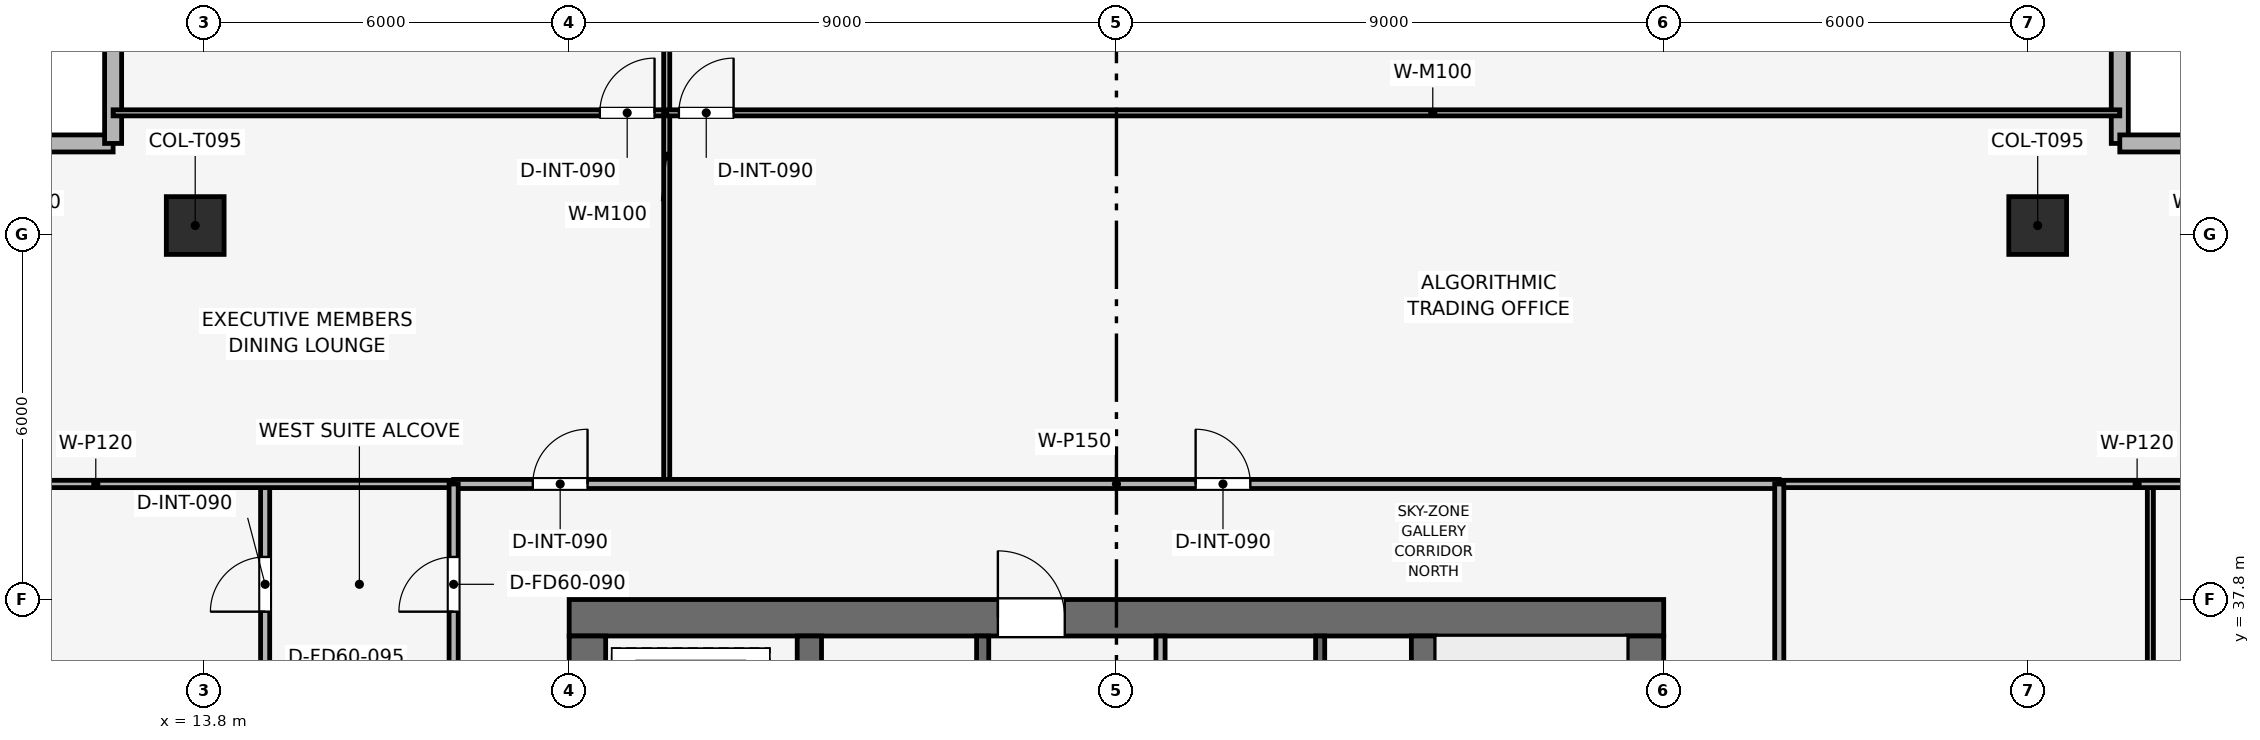
"""IFC4 building model, lengths in metres.
Left out: names, types, materials, properties, quantities, classifications, styles, units other than length and angle.
Written with IfcOpenShell. Run it as: python <this file> out.ifc"""

import sys

from ifc_helpers import new_model, si_unit, direction, frame, frame_2d, origin, origin_2d, place, context, subcontext, project, spatial, rectangle, extrude, element, fill, save


model = new_model("IFC4")
c1 = context("Model", 3, precision=1e-05, world=origin(), true_north=direction((0.0, 1.0)))
c2 = subcontext(c1, "Body", "Model", "MODEL_VIEW")
j1 = project(units=[si_unit("LENGTHUNIT", "METRE"), si_unit("PLANEANGLEUNIT", "RADIAN")], contexts=[c1])
p1 = place(None, origin())
s1 = spatial("IfcSite", under=j1, at=p1, CompositionType="ELEMENT")
p2 = place(p1, origin())
s2 = spatial("IfcBuilding", under=s1, at=p2, CompositionType="ELEMENT")
p3 = place(p2, frame((0.0, 0.0, 321.75)))
s3 = spatial("IfcBuildingStorey", under=s2, at=p3, CompositionType="ELEMENT", Elevation=321.75)
p4 = place(p3, frame((19.8, 37.5, 0.0), z_axis=(0.0, 0.0, 1.0), x_axis=(1.0, 0.0, 0.0)))
e1 = element("IfcWall", 1, at=p4, inside=s3, PredefinedType="SHEAR", context=c2, shape_type="SweptSolid", body=[
    extrude(rectangle(XDim=18.0, YDim=0.6, at=frame_2d((9.0, 0.0))), origin(), (0.0, 0.0, 1.0), 3.75),
])
p5 = place(p4, frame((7.05, 0.0, 0.0)))
e2 = element("IfcOpeningElement", 2, at=p5, cuts=e1, PredefinedType="OPENING", context=c2, shape_type="SweptSolid", body=[
    extrude(rectangle(XDim=1.1, YDim=2.15, at=frame_2d((0.55, 1.075))), frame((0.0, 0.31, 0.0), z_axis=(0.0, -1.0, 0.0), x_axis=(1.0, 0.0, 0.0)), (0.0, 0.0, 1.0), 0.62),
])
p6 = place(p3, frame((20.1, 20.4, 0.0), z_axis=(0.0, 0.0, 1.0), x_axis=(0.0, 1.0, 0.0)))
e3 = element("IfcWall", 3, at=p6, inside=s3, PredefinedType="SHEAR", context=c2, shape_type="SweptSolid", body=[
    extrude(rectangle(XDim=16.8, YDim=0.6, at=frame_2d((8.4, 0.0))), origin(), (0.0, 0.0, 1.0), 3.75),
])
p7 = place(p6, frame((10.4, 0.0, 0.0)))
e4 = element("IfcOpeningElement", 4, at=p7, cuts=e3, PredefinedType="OPENING", context=c2, shape_type="SweptSolid", body=[
    extrude(rectangle(XDim=1.1, YDim=2.15, at=frame_2d((0.55, 1.075))), frame((0.0, 0.31, 0.0), z_axis=(0.0, -1.0, 0.0), x_axis=(1.0, 0.0, 0.0)), (0.0, 0.0, 1.0), 0.62),
])
p8 = place(p3, frame((37.5, 20.4, 0.0), z_axis=(0.0, 0.0, 1.0), x_axis=(0.0, 1.0, 0.0)))
e5 = element("IfcWall", 5, at=p8, inside=s3, PredefinedType="SHEAR", context=c2, shape_type="SweptSolid", body=[
    extrude(rectangle(XDim=16.8, YDim=0.6, at=frame_2d((8.4, 0.0))), origin(), (0.0, 0.0, 1.0), 3.75),
])
p9 = place(p8, frame((4.9, 0.0, 0.0)))
e6 = element("IfcOpeningElement", 6, at=p9, cuts=e5, PredefinedType="OPENING", context=c2, shape_type="SweptSolid", body=[
    extrude(rectangle(XDim=1.1, YDim=2.15, at=frame_2d((0.55, 1.075))), frame((0.0, 0.31, 0.0), z_axis=(0.0, -1.0, 0.0), x_axis=(1.0, 0.0, 0.0)), (0.0, 0.0, 1.0), 0.62),
])
for number, where, z_axis, x_axis in (
    (7, (23.75, 20.4, 0.0), (0.0, 0.0, 1.0), (0.0, 1.0, 0.0)),
    (8, (33.85, 20.4, 0.0), (0.0, 0.0, 1.0), (0.0, 1.0, 0.0)),
):
    element("IfcWall", number, at=place(p3, frame(where, z_axis=z_axis, x_axis=x_axis)), inside=s3, PredefinedType="SHEAR", context=c2, shape_type="SweptSolid", body=[
        extrude(rectangle(XDim=16.8, YDim=0.4, at=frame_2d((8.4, 0.0))), origin(), (0.0, 0.0, 1.0), 3.75),
    ])
for number, where, z_axis, x_axis in (
    (9, (43.95, 43.95, 0.003), (0.0, 0.0, 1.0), (1.0, 0.0, 0.0)),
    (10, (13.65, 43.95, 0.003), (0.0, 0.0, 1.0), (1.0, 0.0, 0.0)),
):
    element("IfcColumn", number, at=place(p3, frame(where, z_axis=z_axis, x_axis=x_axis)), inside=s3, PredefinedType="COLUMN", context=c2, shape_type="SweptSolid", body=[
        extrude(rectangle(XDim=0.95, YDim=0.95, at=origin_2d()), origin(), (0.0, 0.0, 1.0), 3.504),
    ])
p10 = place(p3, frame((6.13, 45.3, 0.0), z_axis=(0.0, 0.0, 1.0), x_axis=(1.0, 0.0, 0.0)))
e11 = element("IfcWall", 11, at=p10, inside=s3, PredefinedType="SOLIDWALL", context=c2, shape_type="SweptSolid", body=[
    extrude(rectangle(XDim=6.17, YDim=0.28, at=frame_2d((3.085, 0.0))), origin(), (0.0, 0.0, 1.0), 3.51),
])
p11 = place(p10, frame((1.835, 0.0, 0.9)))
e12 = element("IfcOpeningElement", 12, at=p11, cuts=e11, PredefinedType="OPENING", context=c2, shape_type="SweptSolid", body=[
    extrude(rectangle(XDim=2.5, YDim=1.9, at=frame_2d((1.25, 0.95))), frame((0.0, 0.15, 0.0), z_axis=(0.0, -1.0, 0.0), x_axis=(1.0, 0.0, 0.0)), (0.0, 0.0, 1.0), 0.3),
])
p12 = place(p3, frame((12.3, 45.3, 0.0), z_axis=(0.0, 0.0, 1.0), x_axis=(0.0, 1.0, 0.0)))
e13 = element("IfcWall", 13, at=p12, inside=s3, PredefinedType="SOLIDWALL", context=c2, shape_type="SweptSolid", body=[
    extrude(rectangle(XDim=6.17, YDim=0.28, at=frame_2d((3.085, 0.0))), origin(), (0.0, 0.0, 1.0), 3.51),
])
p13 = place(p12, frame((1.835, 0.0, 0.9)))
e14 = element("IfcOpeningElement", 14, at=p13, cuts=e13, PredefinedType="OPENING", context=c2, shape_type="SweptSolid", body=[
    extrude(rectangle(XDim=2.5, YDim=1.9, at=frame_2d((1.25, 0.95))), frame((0.0, 0.15, 0.0), z_axis=(0.0, -1.0, 0.0), x_axis=(1.0, 0.0, 0.0)), (0.0, 0.0, 1.0), 0.3),
])
p14 = place(p3, frame((45.3, 51.47, 0.0), z_axis=(0.0, 0.0, 1.0), x_axis=(0.0, -1.0, 0.0)))
e15 = element("IfcWall", 15, at=p14, inside=s3, PredefinedType="SOLIDWALL", context=c2, shape_type="SweptSolid", body=[
    extrude(rectangle(XDim=6.17, YDim=0.28, at=frame_2d((3.085, 0.0))), origin(), (0.0, 0.0, 1.0), 3.51),
])
p15 = place(p14, frame((1.835, 0.0, 0.9)))
e16 = element("IfcOpeningElement", 16, at=p15, cuts=e15, PredefinedType="OPENING", context=c2, shape_type="SweptSolid", body=[
    extrude(rectangle(XDim=2.5, YDim=1.9, at=frame_2d((1.25, 0.95))), frame((0.0, 0.15, 0.0), z_axis=(0.0, -1.0, 0.0), x_axis=(1.0, 0.0, 0.0)), (0.0, 0.0, 1.0), 0.3),
])
p16 = place(p3, frame((45.3, 45.3, 0.0), z_axis=(0.0, 0.0, 1.0), x_axis=(1.0, 0.0, 0.0)))
e17 = element("IfcWall", 17, at=p16, inside=s3, PredefinedType="SOLIDWALL", context=c2, shape_type="SweptSolid", body=[
    extrude(rectangle(XDim=6.17, YDim=0.28, at=frame_2d((3.085, 0.0))), origin(), (0.0, 0.0, 1.0), 3.51),
])
p17 = place(p16, frame((1.835, 0.0, 0.9)))
e18 = element("IfcOpeningElement", 18, at=p17, cuts=e17, PredefinedType="OPENING", context=c2, shape_type="SweptSolid", body=[
    extrude(rectangle(XDim=2.5, YDim=1.9, at=frame_2d((1.25, 0.95))), frame((0.0, 0.15, 0.0), z_axis=(0.0, -1.0, 0.0), x_axis=(1.0, 0.0, 0.0)), (0.0, 0.0, 1.0), 0.3),
])
p18 = place(p3, frame((32.15, 34.0, 0.0), z_axis=(0.0, 0.0, 1.0), x_axis=(0.0, 1.0, 0.0)))
e19 = element("IfcWall", 19, at=p18, inside=s3, PredefinedType="SHEAR", context=c2, shape_type="SweptSolid", body=[
    extrude(rectangle(XDim=3.2, YDim=0.15, at=frame_2d((1.6, 0.0))), origin(), (0.0, 0.0, 1.0), 3.51),
])
p19 = place(p3, frame((26.6, 34.0, 0.0), z_axis=(0.0, 0.0, 1.0), x_axis=(0.0, 1.0, 0.0)))
e20 = element("IfcWall", 20, at=p19, inside=s3, PredefinedType="SHEAR", context=c2, shape_type="SweptSolid", body=[
    extrude(rectangle(XDim=3.2, YDim=0.2, at=frame_2d((1.6, 0.0))), origin(), (0.0, 0.0, 1.0), 3.51),
])
p20 = place(p19, frame((0.75, 0.0, 0.0)))
e21 = element("IfcOpeningElement", 21, at=p20, cuts=e20, PredefinedType="OPENING", context=c2, shape_type="SweptSolid", body=[
    extrude(rectangle(XDim=1.1, YDim=2.15, at=frame_2d((0.55, 1.075))), frame((0.0, 0.11, 0.0), z_axis=(0.0, -1.0, 0.0), x_axis=(1.0, 0.0, 0.0)), (0.0, 0.0, 1.0), 0.22),
])
p21 = place(p3, frame((29.525, 33.925, 0.0), z_axis=(0.0, 0.0, 1.0), x_axis=(0.0, 1.0, 0.0)))
e22 = element("IfcWall", 22, at=p21, inside=s3, PredefinedType="PARTITIONING", context=c2, shape_type="SweptSolid", body=[
    extrude(rectangle(XDim=3.275, YDim=0.15, at=frame_2d((1.637, 0.0))), origin(), (0.0, 0.0, 1.0), 3.51),
])
p22 = place(p21, frame((0.85, 0.0, 0.0)))
e23 = element("IfcOpeningElement", 23, at=p22, cuts=e22, PredefinedType="OPENING", context=c2, shape_type="SweptSolid", body=[
    extrude(rectangle(XDim=0.9, YDim=2.1, at=frame_2d((0.45, 1.05))), frame((0.0, 0.085, 0.0), z_axis=(0.0, -1.0, 0.0), x_axis=(1.0, 0.0, 0.0)), (0.0, 0.0, 1.0), 0.17),
])
p23 = place(p3, frame((12.3, 45.803, 0.0), z_axis=(0.0, 0.0, 1.0), x_axis=(1.0, 0.0, 0.0)))
e24 = element("IfcWall", 24, at=p23, inside=s3, PredefinedType="MOVABLE", context=c2, shape_type="SweptSolid", body=[
    extrude(rectangle(XDim=9.104, YDim=0.1, at=frame_2d((4.552, 0.0))), origin(), (0.0, 0.0, 1.0), 3.095),
])
p24 = place(p23, frame((8.004, 0.0, 0.0)))
e25 = element("IfcOpeningElement", 25, at=p24, cuts=e24, PredefinedType="OPENING", context=c2, shape_type="SweptSolid", body=[
    extrude(rectangle(XDim=0.9, YDim=2.1, at=frame_2d((0.45, 1.05))), frame((0.0, 0.06, 0.0), z_axis=(0.0, -1.0, 0.0), x_axis=(1.0, 0.0, 0.0)), (0.0, 0.0, 1.0), 0.12),
])
p25 = place(p3, frame((21.404, 39.7, 0.0), z_axis=(0.0, 0.0, 1.0), x_axis=(0.0, 1.0, 0.0)))
e26 = element("IfcWall", 26, at=p25, inside=s3, PredefinedType="MOVABLE", context=c2, shape_type="SweptSolid", body=[
    extrude(rectangle(XDim=11.77, YDim=0.1, at=frame_2d((5.885, 0.0))), origin(), (0.0, 0.0, 1.0), 3.135),
])
p26 = place(p3, frame((21.404, 45.803, 0.0), z_axis=(0.0, 0.0, 1.0), x_axis=(1.0, 0.0, 0.0)))
e27 = element("IfcWall", 27, at=p26, inside=s3, PredefinedType="MOVABLE", context=c2, shape_type="SweptSolid", body=[
    extrude(rectangle(XDim=23.896, YDim=0.1, at=frame_2d((11.948, 0.0))), origin(), (0.0, 0.0, 1.0), 3.095),
])
p27 = place(p26, frame((0.2, 0.0, 0.0)))
e28 = element("IfcOpeningElement", 28, at=p27, cuts=e27, PredefinedType="OPENING", context=c2, shape_type="SweptSolid", body=[
    extrude(rectangle(XDim=0.9, YDim=2.1, at=frame_2d((0.45, 1.05))), frame((0.0, 0.06, 0.0), z_axis=(0.0, -1.0, 0.0), x_axis=(1.0, 0.0, 0.0)), (0.0, 0.0, 1.0), 0.12),
])
p28 = place(p3, frame((14.8, 28.0, 0.0), z_axis=(0.0, 0.0, 1.0), x_axis=(0.0, 1.0, 0.0)))
e29 = element("IfcWall", 29, at=p28, inside=s3, PredefinedType="PARTITIONING", context=c2, shape_type="SweptSolid", body=[
    extrude(rectangle(XDim=11.7, YDim=0.15, at=frame_2d((5.85, 0.0))), origin(), (0.0, 0.0, 1.0), 3.095),
])
p29 = place(p28, frame((9.6, 0.0, 0.0)))
e30 = element("IfcOpeningElement", 30, at=p29, cuts=e29, PredefinedType="OPENING", context=c2, shape_type="SweptSolid", body=[
    extrude(rectangle(XDim=0.9, YDim=2.1, at=frame_2d((0.45, 1.05))), frame((0.0, 0.085, 0.0), z_axis=(0.0, -1.0, 0.0), x_axis=(1.0, 0.0, 0.0)), (0.0, 0.0, 1.0), 0.17),
])
p30 = place(p3, frame((45.803, 29.428, 0.0), z_axis=(0.0, 0.0, 1.0), x_axis=(0.0, 1.0, 0.0)))
e31 = element("IfcWall", 31, at=p30, inside=s3, PredefinedType="MOVABLE", context=c2, shape_type="SweptSolid", body=[
    extrude(rectangle(XDim=10.272, YDim=0.1, at=frame_2d((5.136, 0.0))), origin(), (0.0, 0.0, 1.0), 3.095),
])
p31 = place(p30, frame((5.808, 0.0, 0.0)))
e32 = element("IfcOpeningElement", 32, at=p31, cuts=e31, PredefinedType="OPENING", context=c2, shape_type="SweptSolid", body=[
    extrude(rectangle(XDim=0.9, YDim=2.1, at=frame_2d((0.45, 1.05))), frame((0.0, 0.06, 0.0), z_axis=(0.0, -1.0, 0.0), x_axis=(1.0, 0.0, 0.0)), (0.0, 0.0, 1.0), 0.12),
])
for number, where, z_axis, x_axis in (
    (33, (6.13, 39.7, 0.0), (0.0, 0.0, 1.0), (1.0, 0.0, 0.0)),
    (34, (39.7, 39.7, 0.0), (0.0, 0.0, 1.0), (1.0, 0.0, 0.0)),
):
    element("IfcWall", number, at=place(p3, frame(where, z_axis=z_axis, x_axis=x_axis)), inside=s3, PredefinedType="PARTITIONING", context=c2, shape_type="SweptSolid", body=[
        extrude(rectangle(XDim=11.77, YDim=0.12, at=frame_2d((5.885, 0.0))), origin(), (0.0, 0.0, 1.0), 3.095),
    ])
p32 = place(p3, frame((17.9, 39.7, 0.0), z_axis=(0.0, 0.0, 1.0), x_axis=(1.0, 0.0, 0.0)))
e35 = element("IfcWall", 35, at=p32, inside=s3, PredefinedType="PARTITIONING", context=c2, shape_type="SweptSolid", body=[
    extrude(rectangle(XDim=21.8, YDim=0.15, at=frame_2d((10.9, 0.0))), origin(), (0.0, 0.0, 1.0), 3.095),
])
p33 = place(p32, frame((1.302, 0.0, 0.0)))
e36 = element("IfcOpeningElement", 36, at=p33, cuts=e35, PredefinedType="OPENING", context=c2, shape_type="SweptSolid", body=[
    extrude(rectangle(XDim=0.9, YDim=2.1, at=frame_2d((0.45, 1.05))), frame((0.0, 0.085, 0.0), z_axis=(0.0, -1.0, 0.0), x_axis=(1.0, 0.0, 0.0)), (0.0, 0.0, 1.0), 0.17),
])
p34 = place(p32, frame((12.202, 0.0, 0.0)))
e37 = element("IfcOpeningElement", 37, at=p34, cuts=e35, PredefinedType="OPENING", context=c2, shape_type="SweptSolid", body=[
    extrude(rectangle(XDim=0.9, YDim=2.1, at=frame_2d((0.45, 1.05))), frame((0.0, 0.085, 0.0), z_axis=(0.0, -1.0, 0.0), x_axis=(1.0, 0.0, 0.0)), (0.0, 0.0, 1.0), 0.17),
])
p35 = place(p3, frame((17.9, 12.3, 0.0), z_axis=(0.0, 0.0, 1.0), x_axis=(0.0, 1.0, 0.0)))
e38 = element("IfcWall", 38, at=p35, inside=s3, PredefinedType="PARTITIONING", context=c2, shape_type="SweptSolid", body=[
    extrude(rectangle(XDim=27.4, YDim=0.15, at=frame_2d((13.7, 0.0))), origin(), (0.0, 0.0, 1.0), 3.095),
])
p36 = place(p35, frame((0.7, 0.0, 0.0)))
e39 = element("IfcOpeningElement", 39, at=p36, cuts=e38, PredefinedType="OPENING", context=c2, shape_type="SweptSolid", body=[
    extrude(rectangle(XDim=0.9, YDim=2.1, at=frame_2d((0.45, 1.05))), frame((0.0, 0.085, 0.0), z_axis=(0.0, -1.0, 0.0), x_axis=(1.0, 0.0, 0.0)), (0.0, 0.0, 1.0), 0.17),
])
p37 = place(p35, frame((4.534, 0.0, 0.0)))
e40 = element("IfcOpeningElement", 40, at=p37, cuts=e38, PredefinedType="OPENING", context=c2, shape_type="SweptSolid", body=[
    extrude(rectangle(XDim=0.9, YDim=2.1, at=frame_2d((0.45, 1.05))), frame((0.0, 0.085, 0.0), z_axis=(0.0, -1.0, 0.0), x_axis=(1.0, 0.0, 0.0)), (0.0, 0.0, 1.0), 0.17),
])
p38 = place(p35, frame((11.234, 0.0, 0.0)))
e41 = element("IfcOpeningElement", 41, at=p38, cuts=e38, PredefinedType="OPENING", context=c2, shape_type="SweptSolid", body=[
    extrude(rectangle(XDim=0.9, YDim=2.1, at=frame_2d((0.45, 1.05))), frame((0.0, 0.085, 0.0), z_axis=(0.0, -1.0, 0.0), x_axis=(1.0, 0.0, 0.0)), (0.0, 0.0, 1.0), 0.17),
])
p39 = place(p35, frame((16.65, 0.0, 0.0)))
e42 = element("IfcOpeningElement", 42, at=p39, cuts=e38, PredefinedType="OPENING", context=c2, shape_type="SweptSolid", body=[
    extrude(rectangle(XDim=0.9, YDim=2.1, at=frame_2d((0.45, 1.05))), frame((0.0, 0.085, 0.0), z_axis=(0.0, -1.0, 0.0), x_axis=(1.0, 0.0, 0.0)), (0.0, 0.0, 1.0), 0.17),
])
p40 = place(p35, frame((19.55, 0.0, 0.0)))
e43 = element("IfcOpeningElement", 43, at=p40, cuts=e38, PredefinedType="OPENING", context=c2, shape_type="SweptSolid", body=[
    extrude(rectangle(XDim=0.9, YDim=2.1, at=frame_2d((0.45, 1.05))), frame((0.0, 0.085, 0.0), z_axis=(0.0, -1.0, 0.0), x_axis=(1.0, 0.0, 0.0)), (0.0, 0.0, 1.0), 0.17),
])
p41 = place(p35, frame((22.3, 0.0, 0.0)))
e44 = element("IfcOpeningElement", 44, at=p41, cuts=e38, PredefinedType="OPENING", context=c2, shape_type="SweptSolid", body=[
    extrude(rectangle(XDim=0.95, YDim=2.1, at=frame_2d((0.475, 1.05))), frame((0.0, 0.085, 0.0), z_axis=(0.0, -1.0, 0.0), x_axis=(1.0, 0.0, 0.0)), (0.0, 0.0, 1.0), 0.17),
])
p42 = place(p35, frame((25.3, 0.0, 0.0)))
e45 = element("IfcOpeningElement", 45, at=p42, cuts=e38, PredefinedType="OPENING", context=c2, shape_type="SweptSolid", body=[
    extrude(rectangle(XDim=0.9, YDim=2.1, at=frame_2d((0.45, 1.05))), frame((0.0, 0.085, 0.0), z_axis=(0.0, -1.0, 0.0), x_axis=(1.0, 0.0, 0.0)), (0.0, 0.0, 1.0), 0.17),
])
p43 = place(p3, frame((39.7, 24.4, 0.0), z_axis=(0.0, 0.0, 1.0), x_axis=(0.0, 1.0, 0.0)))
e46 = element("IfcWall", 46, at=p43, inside=s3, PredefinedType="PARTITIONING", context=c2, shape_type="SweptSolid", body=[
    extrude(rectangle(XDim=15.3, YDim=0.15, at=frame_2d((7.65, 0.0))), origin(), (0.0, 0.0, 1.0), 3.095),
])
p44 = place(p43, frame((2.064, 0.0, 0.0)))
e47 = element("IfcOpeningElement", 47, at=p44, cuts=e46, PredefinedType="OPENING", context=c2, shape_type="SweptSolid", body=[
    extrude(rectangle(XDim=0.9, YDim=2.1, at=frame_2d((0.45, 1.05))), frame((0.0, 0.085, 0.0), z_axis=(0.0, -1.0, 0.0), x_axis=(1.0, 0.0, 0.0)), (0.0, 0.0, 1.0), 0.17),
])
p45 = place(p43, frame((9.714, 0.0, 0.0)))
e48 = element("IfcOpeningElement", 48, at=p45, cuts=e46, PredefinedType="OPENING", context=c2, shape_type="SweptSolid", body=[
    extrude(rectangle(XDim=0.9, YDim=2.1, at=frame_2d((0.45, 1.05))), frame((0.0, 0.085, 0.0), z_axis=(0.0, -1.0, 0.0), x_axis=(1.0, 0.0, 0.0)), (0.0, 0.0, 1.0), 0.17),
])
p46 = place(p24, origin())
e49 = element("IfcDoor", 49, at=p46, inside=s3, OperationType="SINGLE_SWING_RIGHT", PredefinedType="DOOR", context=c2, shape_type="SweptSolid", body=[
    extrude(rectangle(XDim=0.9, YDim=2.1, at=frame_2d((0.45, 1.05))), frame((0.0, 0.025, 0.0), z_axis=(0.0, -1.0, 0.0), x_axis=(1.0, 0.0, 0.0)), (0.0, 0.0, 1.0), 0.05),
])
fill(e25, e49)
p47 = place(p27, origin())
e50 = element("IfcDoor", 50, at=p47, inside=s3, OperationType="SINGLE_SWING_RIGHT", PredefinedType="DOOR", context=c2, shape_type="SweptSolid", body=[
    extrude(rectangle(XDim=0.9, YDim=2.1, at=frame_2d((0.45, 1.05))), frame((0.0, 0.025, 0.0), z_axis=(0.0, -1.0, 0.0), x_axis=(1.0, 0.0, 0.0)), (0.0, 0.0, 1.0), 0.05),
])
fill(e28, e50)
p48 = place(p29, origin())
e51 = element("IfcDoor", 51, at=p48, inside=s3, OperationType="SINGLE_SWING_LEFT", PredefinedType="DOOR", context=c2, shape_type="SweptSolid", body=[
    extrude(rectangle(XDim=0.9, YDim=2.1, at=frame_2d((0.45, 1.05))), frame((0.0, 0.025, 0.0), z_axis=(0.0, -1.0, 0.0), x_axis=(1.0, 0.0, 0.0)), (0.0, 0.0, 1.0), 0.05),
])
fill(e30, e51)
p49 = place(p33, origin())
e52 = element("IfcDoor", 52, at=p49, inside=s3, OperationType="SINGLE_SWING_RIGHT", PredefinedType="DOOR", context=c2, shape_type="SweptSolid", body=[
    extrude(rectangle(XDim=0.9, YDim=2.1, at=frame_2d((0.45, 1.05))), frame((0.0, 0.025, 0.0), z_axis=(0.0, -1.0, 0.0), x_axis=(1.0, 0.0, 0.0)), (0.0, 0.0, 1.0), 0.05),
])
fill(e36, e52)
p50 = place(p34, origin())
e53 = element("IfcDoor", 53, at=p50, inside=s3, OperationType="SINGLE_SWING_LEFT", PredefinedType="DOOR", context=c2, shape_type="SweptSolid", body=[
    extrude(rectangle(XDim=0.9, YDim=2.1, at=frame_2d((0.45, 1.05))), frame((0.0, 0.025, 0.0), z_axis=(0.0, -1.0, 0.0), x_axis=(1.0, 0.0, 0.0)), (0.0, 0.0, 1.0), 0.05),
])
fill(e37, e53)
p51 = place(p42, origin())
e54 = element("IfcDoor", 54, at=p51, inside=s3, OperationType="SINGLE_SWING_LEFT", PredefinedType="DOOR", context=c2, shape_type="SweptSolid", body=[
    extrude(rectangle(XDim=0.9, YDim=2.1, at=frame_2d((0.45, 1.05))), frame((0.0, 0.025, 0.0), z_axis=(0.0, -1.0, 0.0), x_axis=(1.0, 0.0, 0.0)), (0.0, 0.0, 1.0), 0.05),
])
fill(e45, e54)
p52 = place(p5, origin())
e55 = element("IfcDoor", 55, at=p52, inside=s3, OperationType="SINGLE_SWING_LEFT", PredefinedType="DOOR", context=c2, shape_type="SweptSolid", body=[
    extrude(rectangle(XDim=1.1, YDim=2.15, at=frame_2d((0.55, 1.075))), frame((0.0, 0.025, 0.0), z_axis=(0.0, -1.0, 0.0), x_axis=(1.0, 0.0, 0.0)), (0.0, 0.0, 1.0), 0.05),
])
fill(e2, e55)
save(model, sys.argv[1])
